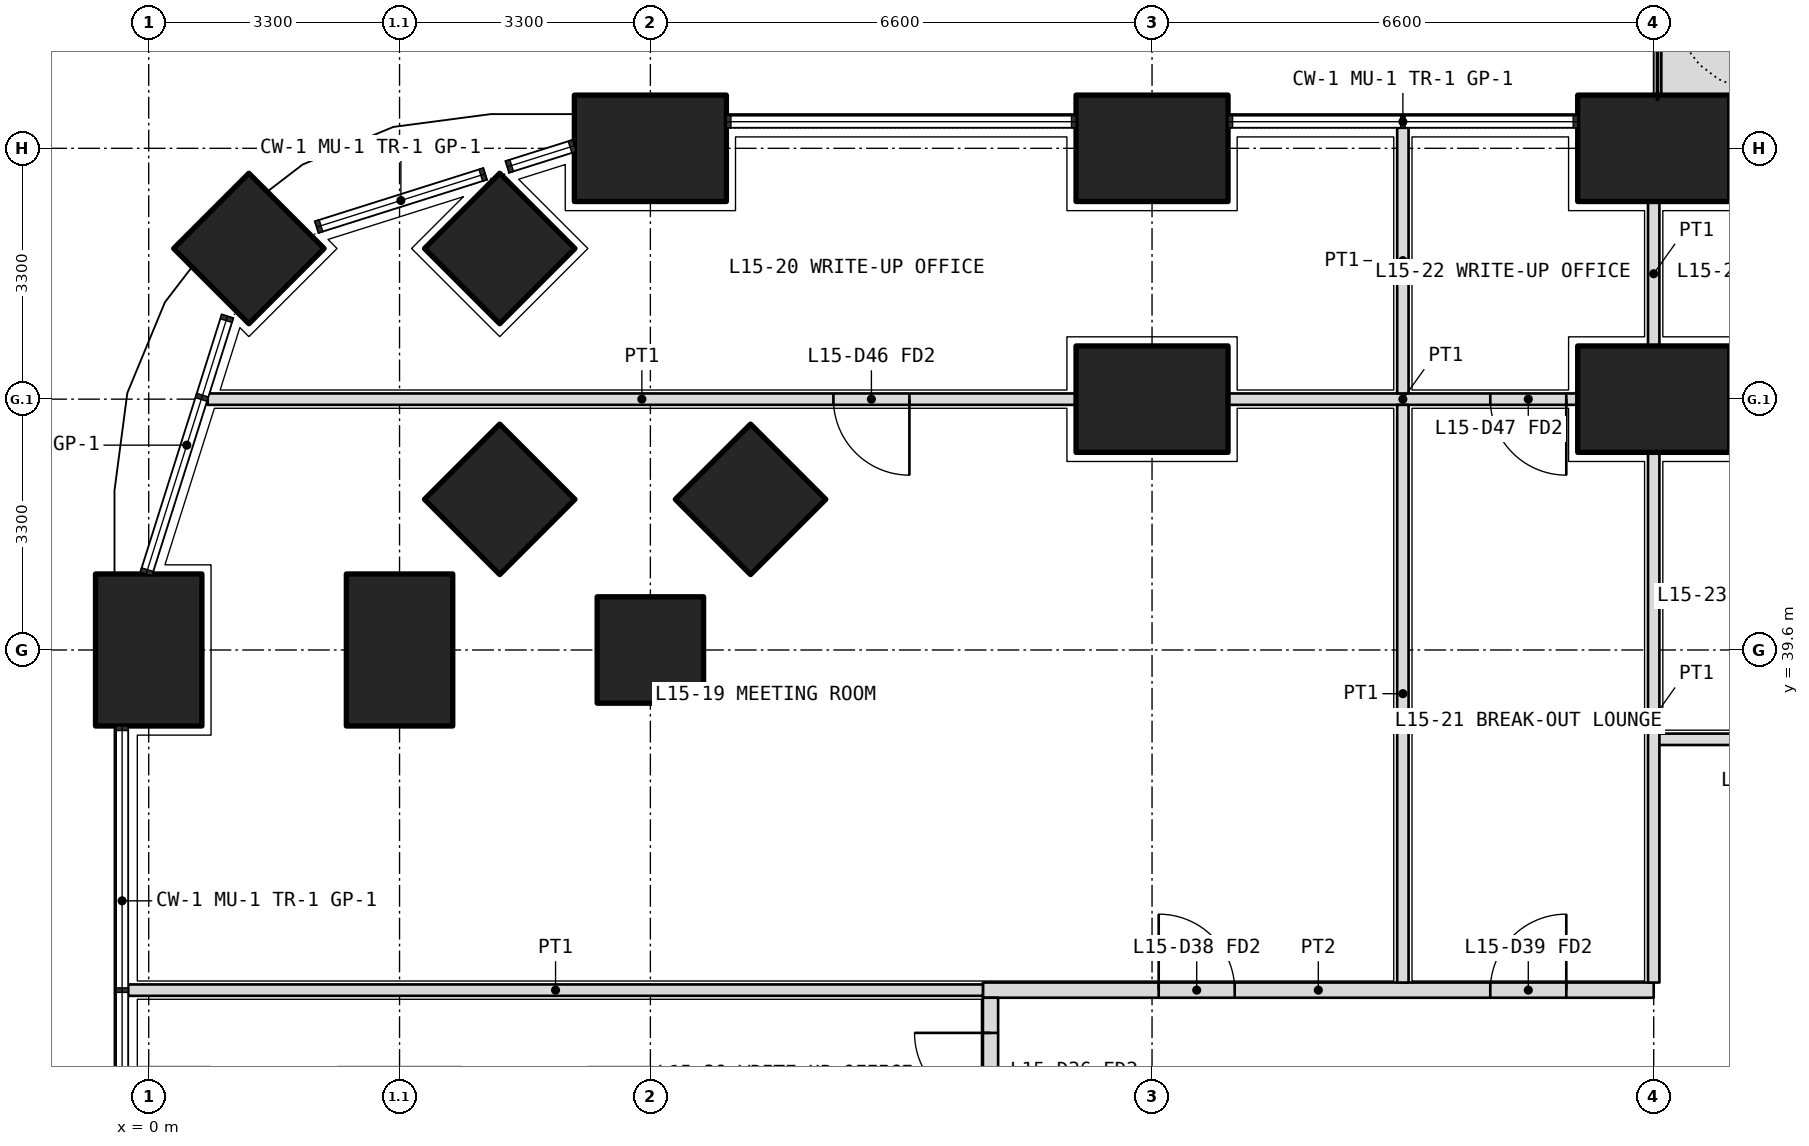
"""IFC4 building model, lengths in metres.
Left out: names, types, materials, properties, quantities, classifications, styles, units other than length and angle.
Written with IfcOpenShell. Run it as: python <this file> out.ifc"""

import sys

from ifc_helpers import new_model, si_unit, direction, frame, frame_2d, origin, origin_2d, place, context, subcontext, project, spatial, polyline, rectangle, outline, extrude, element, fill, save


model = new_model("IFC4")
c1 = context("Model", 3, precision=1e-05, world=origin(), true_north=direction((0.0, 1.0)))
c2 = subcontext(c1, "Body", "Model", "MODEL_VIEW")
j1 = project(units=[si_unit("LENGTHUNIT", "METRE"), si_unit("PLANEANGLEUNIT", "RADIAN")], contexts=[c1])
p1 = place(None, origin())
s1 = spatial("IfcSite", under=j1, at=p1, CompositionType="ELEMENT")
p2 = place(p1, origin())
s2 = spatial("IfcBuilding", under=s1, at=p2, CompositionType="ELEMENT")
p3 = place(p2, frame((0.0, 0.0, 67.5)))
s3 = spatial("IfcBuildingStorey", under=s2, at=p3, CompositionType="ELEMENT", Elevation=67.5)
p4 = place(p3, frame((1.318, 44.882, 0.0), z_axis=(0.0, 0.0, 1.0), x_axis=(0.707106781187, 0.707106781187, 0.0)))
e1 = element("IfcColumn", 1, at=p4, inside=s3, PredefinedType="COLUMN", context=c2, shape_type="SweptSolid", body=[
    extrude(rectangle(XDim=1.4, YDim=1.4, at=origin_2d()), origin(), (0.0, 0.0, 1.0), 4.2),
])
for number, where, z_axis, x_axis in (
    (2, (0.0, 39.6, 0.0), (0.0, 0.0, 1.0), (0.0, 1.0, 0.0)),
    (3, (6.6, 46.2, 0.0), (0.0, 0.0, 1.0), (1.0, 0.0, 0.0)),
    (4, (13.2, 46.2, 0.0), (0.0, 0.0, 1.0), (1.0, 0.0, 0.0)),
    (5, (19.8, 46.2, 0.0), (0.0, 0.0, 1.0), (1.0, 0.0, 0.0)),
):
    element("IfcColumn", number, at=place(p3, frame(where, z_axis=z_axis, x_axis=x_axis)), inside=s3, PredefinedType="COLUMN", context=c2, shape_type="SweptSolid", body=[
        extrude(rectangle(XDim=2.0, YDim=1.4, at=origin_2d()), origin(), (0.0, 0.0, 1.0), 4.2),
    ])
for number, where, z_axis, x_axis in (
    (6, (6.6, 39.6, 0.0), (0.0, 0.0, 1.0), (1.0, 0.0, 0.0)),
    (7, (4.618, 44.882, 0.0), (0.0, 0.0, 1.0), (0.707, 0.707, 0.0)),
):
    element("IfcColumn", number, at=place(p3, frame(where, z_axis=z_axis, x_axis=x_axis)), inside=s3, PredefinedType="COLUMN", context=c2, shape_type="SweptSolid", body=[
        extrude(rectangle(XDim=1.4, YDim=1.4, at=origin_2d()), origin(), (0.0, 0.0, 1.0), 4.2),
    ])
p5 = place(p3, frame((3.3, 39.6, 0.0), z_axis=(0.0, 0.0, 1.0), x_axis=(0.0, 1.0, 0.0)))
e8 = element("IfcColumn", 8, at=p5, inside=s3, PredefinedType="COLUMN", context=c2, shape_type="SweptSolid", body=[
    extrude(rectangle(XDim=2.0, YDim=1.4, at=origin_2d()), origin(), (0.0, 0.0, 1.0), 4.2),
])
p6 = place(p3, frame((4.618, 41.582, 0.0), z_axis=(0.0, 0.0, 1.0), x_axis=(0.707106781187, 0.707106781187, 0.0)))
e9 = element("IfcColumn", 9, at=p6, inside=s3, PredefinedType="COLUMN", context=c2, shape_type="SweptSolid", body=[
    extrude(rectangle(XDim=1.4, YDim=1.4, at=origin_2d()), origin(), (0.0, 0.0, 1.0), 4.2),
])
for number, where, z_axis, x_axis in (
    (10, (13.2, 42.9, 0.0), (0.0, 0.0, 1.0), (1.0, 0.0, 0.0)),
    (11, (19.8, 42.9, 0.0), (0.0, 0.0, 1.0), (1.0, 0.0, 0.0)),
):
    element("IfcColumn", number, at=place(p3, frame(where, z_axis=z_axis, x_axis=x_axis)), inside=s3, PredefinedType="COLUMN", context=c2, shape_type="SweptSolid", body=[
        extrude(rectangle(XDim=2.0, YDim=1.4, at=origin_2d()), origin(), (0.0, 0.0, 1.0), 4.2),
    ])
p7 = place(p3, frame((7.918, 41.582, 0.0), z_axis=(0.0, 0.0, 1.0), x_axis=(0.707106781187, 0.707106781187, 0.0)))
e12 = element("IfcColumn", 12, at=p7, inside=s3, PredefinedType="COLUMN", context=c2, shape_type="SweptSolid", body=[
    extrude(rectangle(XDim=1.4, YDim=1.4, at=origin_2d()), origin(), (0.0, 0.0, 1.0), 4.2),
])
p8 = place(p3, origin())
e13 = element("IfcWall", 13, at=p8, inside=s3, PredefinedType="USERDEFINED", context=c2, shape_type="SweptSolid", body=[
    extrude(outline(polyline([(19.9, 46.75), (22.35, 46.75), (22.35, 47.75), (19.9, 47.75), (19.9, 46.75)]), holes=[polyline([(20.05, 46.9), (22.2, 46.9), (22.2, 47.6), (20.05, 47.6), (20.05, 46.9)])]), origin(), (0.0, 0.0, 1.0), 1.05),
])
p9 = place(p3, frame((10.975, 35.125, 0.0), z_axis=(0.0, 0.0, 1.0), x_axis=(1.0, 0.0, 0.0)))
e14 = element("IfcWall", 14, at=p9, inside=s3, PredefinedType="PARTITIONING", context=c2, shape_type="SweptSolid", body=[
    extrude(rectangle(XDim=8.825, YDim=0.2, at=frame_2d((4.413, 0.0))), origin(), (0.0, 0.0, 1.0), 2.85),
])
p10 = place(p9, frame((2.312, 0.0, 0.0)))
e15 = element("IfcOpeningElement", 15, at=p10, cuts=e14, PredefinedType="OPENING", context=c2, shape_type="SweptSolid", body=[
    extrude(rectangle(XDim=1.0, YDim=2.1, at=frame_2d((0.5, 1.05))), frame((0.0, 0.11, 0.0), z_axis=(0.0, -1.0, 0.0), x_axis=(1.0, 0.0, 0.0)), (0.0, 0.0, 1.0), 0.22),
])
p11 = place(p9, frame((6.675, 0.0, 0.0)))
e16 = element("IfcOpeningElement", 16, at=p11, cuts=e14, PredefinedType="OPENING", context=c2, shape_type="SweptSolid", body=[
    extrude(rectangle(XDim=1.0, YDim=2.1, at=frame_2d((0.5, 1.05))), frame((0.0, 0.11, 0.0), z_axis=(0.0, -1.0, 0.0), x_axis=(1.0, 0.0, 0.0)), (0.0, 0.0, 1.0), 0.22),
])
p12 = place(p3, frame((11.075, 11.175, 0.0), z_axis=(0.0, 0.0, 1.0), x_axis=(0.0, 1.0, 0.0)))
e17 = element("IfcWall", 17, at=p12, inside=s3, PredefinedType="PARTITIONING", context=c2, shape_type="SweptSolid", body=[
    extrude(rectangle(XDim=23.85, YDim=0.2, at=frame_2d((11.925, 0.0))), origin(), (0.0, 0.0, 1.0), 2.85),
])
p13 = place(p12, frame((0.462, 0.0, 0.0)))
e18 = element("IfcOpeningElement", 18, at=p13, cuts=e17, PredefinedType="OPENING", context=c2, shape_type="SweptSolid", body=[
    extrude(rectangle(XDim=1.0, YDim=2.1, at=frame_2d((0.5, 1.05))), frame((0.0, 0.11, 0.0), z_axis=(0.0, -1.0, 0.0), x_axis=(1.0, 0.0, 0.0)), (0.0, 0.0, 1.0), 0.22),
])
p14 = place(p12, frame((2.575, 0.0, 0.0)))
e19 = element("IfcOpeningElement", 19, at=p14, cuts=e17, PredefinedType="OPENING", context=c2, shape_type="SweptSolid", body=[
    extrude(rectangle(XDim=1.0, YDim=2.1, at=frame_2d((0.5, 1.05))), frame((0.0, 0.11, 0.0), z_axis=(0.0, -1.0, 0.0), x_axis=(1.0, 0.0, 0.0)), (0.0, 0.0, 1.0), 0.22),
])
p15 = place(p12, frame((5.65, 0.0, 0.0)))
e20 = element("IfcOpeningElement", 20, at=p15, cuts=e17, PredefinedType="OPENING", context=c2, shape_type="SweptSolid", body=[
    extrude(rectangle(XDim=0.9, YDim=2.1, at=frame_2d((0.45, 1.05))), frame((0.0, 0.11, 0.0), z_axis=(0.0, -1.0, 0.0), x_axis=(1.0, 0.0, 0.0)), (0.0, 0.0, 1.0), 0.22),
])
p16 = place(p12, frame((9.5, 0.0, 0.0)))
e21 = element("IfcOpeningElement", 21, at=p16, cuts=e17, PredefinedType="OPENING", context=c2, shape_type="SweptSolid", body=[
    extrude(rectangle(XDim=0.9, YDim=2.1, at=frame_2d((0.45, 1.05))), frame((0.0, 0.11, 0.0), z_axis=(0.0, -1.0, 0.0), x_axis=(1.0, 0.0, 0.0)), (0.0, 0.0, 1.0), 0.22),
])
p17 = place(p12, frame((13.025, 0.0, 0.0)))
e22 = element("IfcOpeningElement", 22, at=p17, cuts=e17, PredefinedType="OPENING", context=c2, shape_type="SweptSolid", body=[
    extrude(rectangle(XDim=1.0, YDim=2.1, at=frame_2d((0.5, 1.05))), frame((0.0, 0.11, 0.0), z_axis=(0.0, -1.0, 0.0), x_axis=(1.0, 0.0, 0.0)), (0.0, 0.0, 1.0), 0.22),
])
p18 = place(p12, frame((18.025, 0.0, 0.0)))
e23 = element("IfcOpeningElement", 23, at=p18, cuts=e17, PredefinedType="OPENING", context=c2, shape_type="SweptSolid", body=[
    extrude(rectangle(XDim=1.0, YDim=2.1, at=frame_2d((0.5, 1.05))), frame((0.0, 0.11, 0.0), z_axis=(0.0, -1.0, 0.0), x_axis=(1.0, 0.0, 0.0)), (0.0, 0.0, 1.0), 0.22),
])
p19 = place(p12, frame((22.387, 0.0, 0.0)))
e24 = element("IfcOpeningElement", 24, at=p19, cuts=e17, PredefinedType="OPENING", context=c2, shape_type="SweptSolid", body=[
    extrude(rectangle(XDim=1.0, YDim=2.1, at=frame_2d((0.5, 1.05))), frame((0.0, 0.11, 0.0), z_axis=(0.0, -1.0, 0.0), x_axis=(1.0, 0.0, 0.0)), (0.0, 0.0, 1.0), 0.22),
])
p20 = place(p3, frame((-0.27, 35.125, 0.0), z_axis=(0.0, 0.0, 1.0), x_axis=(1.0, 0.0, 0.0)))
e25 = element("IfcWall", 25, at=p20, inside=s3, PredefinedType="PARTITIONING", context=c2, shape_type="SweptSolid", body=[
    extrude(rectangle(XDim=11.245, YDim=0.15, at=frame_2d((5.623, 0.0))), origin(), (0.0, 0.0, 1.0), 2.6),
])
p21 = place(p3, frame((18.8, 42.9, 0.0), z_axis=(0.0, 0.0, 1.0), x_axis=(-1.0, 0.0, 0.0)))
e26 = element("IfcWall", 26, at=p21, inside=s3, PredefinedType="PARTITIONING", context=c2, shape_type="SweptSolid", body=[
    extrude(rectangle(XDim=4.6, YDim=0.15, at=frame_2d((2.3, 0.0))), origin(), (0.0, 0.0, 1.0), 3.9),
])
p22 = place(p21, frame((0.15, 0.0, 0.0)))
e27 = element("IfcOpeningElement", 27, at=p22, cuts=e26, PredefinedType="OPENING", context=c2, shape_type="SweptSolid", body=[
    extrude(rectangle(XDim=1.0, YDim=2.1, at=frame_2d((0.5, 1.05))), frame((0.0, 0.085, 0.0), z_axis=(0.0, -1.0, 0.0), x_axis=(1.0, 0.0, 0.0)), (0.0, 0.0, 1.0), 0.17),
])
p23 = place(p3, frame((12.2, 42.9, 0.0), z_axis=(0.0, 0.0, 1.0), x_axis=(-1.0, 0.0, 0.0)))
e28 = element("IfcWall", 28, at=p23, inside=s3, PredefinedType="PARTITIONING", context=c2, shape_type="SweptSolid", body=[
    extrude(rectangle(XDim=11.424, YDim=0.15, at=frame_2d((5.712, 0.0))), origin(), (0.0, 0.0, 1.0), 2.6),
])
p24 = place(p23, frame((2.192, 0.0, 0.0)))
e29 = element("IfcOpeningElement", 29, at=p24, cuts=e28, PredefinedType="OPENING", context=c2, shape_type="SweptSolid", body=[
    extrude(rectangle(XDim=1.0, YDim=2.1, at=frame_2d((0.5, 1.05))), frame((0.0, 0.085, 0.0), z_axis=(0.0, -1.0, 0.0), x_axis=(1.0, 0.0, 0.0)), (0.0, 0.0, 1.0), 0.17),
])
p25 = place(p3, frame((19.8, 38.425, 0.0), z_axis=(0.0, 0.0, 1.0), x_axis=(1.0, 0.0, 0.0)))
e30 = element("IfcWall", 30, at=p25, inside=s3, PredefinedType="PARTITIONING", context=c2, shape_type="SweptSolid", body=[
    extrude(rectangle(XDim=3.3, YDim=0.15, at=frame_2d((1.65, 0.0))), origin(), (0.0, 0.0, 1.0), 2.85),
])
p26 = place(p25, frame((1.05, 0.0, 0.0)))
e31 = element("IfcOpeningElement", 31, at=p26, cuts=e30, PredefinedType="OPENING", context=c2, shape_type="SweptSolid", body=[
    extrude(rectangle(XDim=1.2, YDim=2.1, at=frame_2d((0.6, 1.05))), frame((0.0, 0.085, 0.0), z_axis=(0.0, -1.0, 0.0), x_axis=(1.0, 0.0, 0.0)), (0.0, 0.0, 1.0), 0.17),
])
p27 = place(p3, frame((16.5, 46.47, 0.0), z_axis=(0.0, 0.0, 1.0), x_axis=(0.0, -1.0, 0.0)))
e32 = element("IfcWall", 32, at=p27, inside=s3, PredefinedType="PARTITIONING", context=c2, shape_type="SweptSolid", body=[
    extrude(rectangle(XDim=3.495, YDim=0.15, at=frame_2d((1.748, 0.0))), origin(), (0.0, 0.0, 1.0), 2.6),
])
p28 = place(p3, frame((16.5, 42.825, 0.0), z_axis=(0.0, 0.0, 1.0), x_axis=(0.0, -1.0, 0.0)))
e33 = element("IfcWall", 33, at=p28, inside=s3, PredefinedType="PARTITIONING", context=c2, shape_type="SweptSolid", body=[
    extrude(rectangle(XDim=7.6, YDim=0.15, at=frame_2d((3.8, 0.0))), origin(), (0.0, 0.0, 1.0), 3.9),
])
p29 = place(p3, frame((19.8, 45.5, 0.0), z_axis=(0.0, 0.0, 1.0), x_axis=(0.0, -1.0, 0.0)))
e34 = element("IfcWall", 34, at=p29, inside=s3, PredefinedType="PARTITIONING", context=c2, shape_type="SweptSolid", body=[
    extrude(rectangle(XDim=1.9, YDim=0.15, at=frame_2d((0.95, 0.0))), origin(), (0.0, 0.0, 1.0), 2.85),
])
p30 = place(p3, frame((19.8, 42.2, 0.0), z_axis=(0.0, 0.0, 1.0), x_axis=(0.0, -1.0, 0.0)))
e35 = element("IfcWall", 35, at=p30, inside=s3, PredefinedType="PARTITIONING", context=c2, shape_type="SweptSolid", body=[
    extrude(rectangle(XDim=6.975, YDim=0.15, at=frame_2d((3.487, 0.0))), origin(), (0.0, 0.0, 1.0), 2.85),
])
p31 = place(p10, origin())
e36 = element("IfcDoor", 36, at=p31, inside=s3, OperationType="SINGLE_SWING_LEFT", PredefinedType="DOOR", context=c2, shape_type="SweptSolid", body=[
    extrude(rectangle(XDim=1.0, YDim=2.1, at=frame_2d((0.5, 1.05))), frame((0.0, 0.025, 0.0), z_axis=(0.0, -1.0, 0.0), x_axis=(1.0, 0.0, 0.0)), (0.0, 0.0, 1.0), 0.05),
])
fill(e15, e36)
p32 = place(p24, origin())
e37 = element("IfcDoor", 37, at=p32, inside=s3, OperationType="SINGLE_SWING_LEFT", PredefinedType="DOOR", context=c2, shape_type="SweptSolid", body=[
    extrude(rectangle(XDim=1.0, YDim=2.1, at=frame_2d((0.5, 1.05))), frame((0.0, 0.025, 0.0), z_axis=(0.0, -1.0, 0.0), x_axis=(1.0, 0.0, 0.0)), (0.0, 0.0, 1.0), 0.05),
])
fill(e29, e37)
p33 = place(p11, origin())
e38 = element("IfcDoor", 38, at=p33, inside=s3, OperationType="SINGLE_SWING_RIGHT", PredefinedType="DOOR", context=c2, shape_type="SweptSolid", body=[
    extrude(rectangle(XDim=1.0, YDim=2.1, at=frame_2d((0.5, 1.05))), frame((0.0, 0.025, 0.0), z_axis=(0.0, -1.0, 0.0), x_axis=(1.0, 0.0, 0.0)), (0.0, 0.0, 1.0), 0.05),
])
fill(e16, e38)
p34 = place(p22, origin())
e39 = element("IfcDoor", 39, at=p34, inside=s3, OperationType="SINGLE_SWING_LEFT", PredefinedType="DOOR", context=c2, shape_type="SweptSolid", body=[
    extrude(rectangle(XDim=1.0, YDim=2.1, at=frame_2d((0.5, 1.05))), frame((0.0, 0.025, 0.0), z_axis=(0.0, -1.0, 0.0), x_axis=(1.0, 0.0, 0.0)), (0.0, 0.0, 1.0), 0.05),
])
fill(e27, e39)
p35 = place(p19, origin())
e40 = element("IfcDoor", 40, at=p35, inside=s3, OperationType="SINGLE_SWING_RIGHT", PredefinedType="DOOR", context=c2, shape_type="SweptSolid", body=[
    extrude(rectangle(XDim=1.0, YDim=2.1, at=frame_2d((0.5, 1.05))), frame((0.0, 0.025, 0.0), z_axis=(0.0, -1.0, 0.0), x_axis=(1.0, 0.0, 0.0)), (0.0, 0.0, 1.0), 0.05),
])
fill(e24, e40)
save(model, sys.argv[1])
